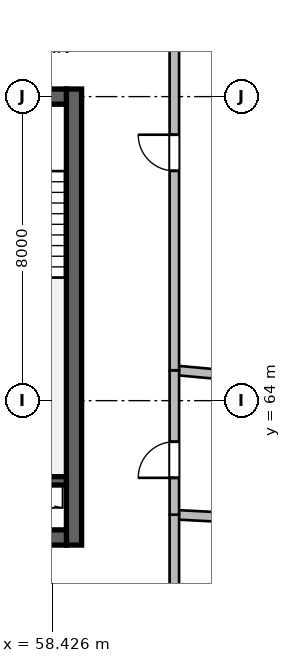
"""IFC4 building model, lengths in metres.
Left out: names, types, materials, properties, quantities, classifications, styles, units other than length and angle.
Written with IfcOpenShell. Run it as: python <this file> out.ifc"""

import sys

from ifc_helpers import new_model, si_unit, direction, frame, frame_2d, origin, place, context, subcontext, project, spatial, rectangle, extrude, source, transform, mapped, element, fill, save


model = new_model("IFC4")
c1 = context("Model", 3, precision=1e-05, world=origin(), true_north=direction((0.0, 1.0)))
c2 = subcontext(c1, "Body", "Model", "MODEL_VIEW")
j1 = project(units=[si_unit("LENGTHUNIT", "METRE"), si_unit("PLANEANGLEUNIT", "RADIAN")], contexts=[c1])
p1 = place(None, origin())
s1 = spatial("IfcSite", under=j1, at=p1, CompositionType="ELEMENT")
p2 = place(p1, origin())
s2 = spatial("IfcBuilding", under=s1, at=p2, CompositionType="ELEMENT")
p3 = place(p2, frame((0.0, 0.0, 260.1)))
s3 = spatial("IfcBuildingStorey", under=s2, at=p3, CompositionType="ELEMENT", Elevation=260.1)
m1 = source(origin(), c2, "Body", "SweptSolid", [
    extrude(rectangle(XDim=12.0, YDim=0.4, at=frame_2d((6.0, 0.0))), origin(), (0.0, 0.0, 1.0), 3.9),
])
p4 = place(p3, frame((59.0, 60.2, 0.0), z_axis=(0.0, 0.0, 1.0), x_axis=(0.0, 1.0, 0.0)))
e1 = element("IfcWall", 1, at=p4, inside=s3, PredefinedType="SHEAR", context=c2, shape_type="MappedRepresentation", body=[
    mapped(m1, transform((0.0, 0.0, 0.0), scale=1.0)),
])
m2 = source(origin(), c2, "Body", "SweptSolid", [
    extrude(rectangle(XDim=21.6, YDim=0.4, at=frame_2d((10.8, 0.0))), origin(), (0.0, 0.0, 1.0), 3.9),
])
p5 = place(p3, frame((37.2, 60.4, 0.0), z_axis=(0.0, 0.0, 1.0), x_axis=(1.0, 0.0, 0.0)))
e2 = element("IfcWall", 2, at=p5, inside=s3, PredefinedType="SHEAR", context=c2, shape_type="MappedRepresentation", body=[
    mapped(m2, transform((0.0, 0.0, 0.0), scale=1.0)),
])
p6 = place(p5, frame((1.1, 0.0, 0.0)))
e3 = element("IfcOpeningElement", 3, at=p6, cuts=e2, PredefinedType="OPENING", context=c2, shape_type="SweptSolid", body=[
    extrude(rectangle(XDim=1.15, YDim=2.15, at=frame_2d((0.575, 1.075))), frame((0.0, 0.21, 0.0), z_axis=(0.0, -1.0, 0.0), x_axis=(1.0, 0.0, 0.0)), (0.0, 0.0, 1.0), 0.42),
])
p7 = place(p5, frame((19.5, 0.0, 0.0)))
e4 = element("IfcOpeningElement", 4, at=p7, cuts=e2, PredefinedType="OPENING", context=c2, shape_type="SweptSolid", body=[
    extrude(rectangle(XDim=0.9, YDim=2.1, at=frame_2d((0.45, 1.05))), frame((0.0, 0.21, 0.0), z_axis=(0.0, -1.0, 0.0), x_axis=(1.0, 0.0, 0.0)), (0.0, 0.0, 1.0), 0.42),
])
p8 = place(p5, frame((12.02, 0.0, 0.0)))
e5 = element("IfcOpeningElement", 5, at=p8, cuts=e2, PredefinedType="OPENING", context=c2, shape_type="SweptSolid", body=[
    extrude(rectangle(XDim=1.6, YDim=2.15, at=frame_2d((0.8, 1.075))), frame((0.0, 0.21, 0.0), z_axis=(0.0, -1.0, 0.0), x_axis=(1.0, 0.0, 0.0)), (0.0, 0.0, 1.0), 0.42),
])
p9 = place(p3, frame((37.2, 72.0, 0.0), z_axis=(0.0, 0.0, 1.0), x_axis=(1.0, 0.0, 0.0)))
e6 = element("IfcWall", 6, at=p9, inside=s3, PredefinedType="SHEAR", context=c2, shape_type="MappedRepresentation", body=[
    mapped(m2, transform((0.0, 0.0, 0.0), scale=1.0)),
])
p10 = place(p9, frame((1.2, 0.0, 0.0)))
e7 = element("IfcOpeningElement", 7, at=p10, cuts=e6, PredefinedType="OPENING", context=c2, shape_type="SweptSolid", body=[
    extrude(rectangle(XDim=0.9, YDim=2.1, at=frame_2d((0.45, 1.05))), frame((0.0, 0.21, 0.0), z_axis=(0.0, -1.0, 0.0), x_axis=(1.0, 0.0, 0.0)), (0.0, 0.0, 1.0), 0.42),
])
p11 = place(p9, frame((14.7, 0.0, 0.0)))
e8 = element("IfcOpeningElement", 8, at=p11, cuts=e6, PredefinedType="OPENING", context=c2, shape_type="SweptSolid", body=[
    extrude(rectangle(XDim=1.2, YDim=2.15, at=frame_2d((0.6, 1.075))), frame((0.0, 0.21, 0.0), z_axis=(0.0, -1.0, 0.0), x_axis=(1.0, 0.0, 0.0)), (0.0, 0.0, 1.0), 0.42),
])
p12 = place(p9, frame((4.15, 0.0, 0.0)))
e9 = element("IfcOpeningElement", 9, at=p12, cuts=e6, PredefinedType="OPENING", context=c2, shape_type="SweptSolid", body=[
    extrude(rectangle(XDim=1.3, YDim=2.15, at=frame_2d((0.65, 1.075))), frame((0.0, 0.21, 0.0), z_axis=(0.0, -1.0, 0.0), x_axis=(1.0, 0.0, 0.0)), (0.0, 0.0, 1.0), 0.42),
])
p13 = place(p9, frame((7.1, 0.0, 0.0)))
e10 = element("IfcOpeningElement", 10, at=p13, cuts=e6, PredefinedType="OPENING", context=c2, shape_type="SweptSolid", body=[
    extrude(rectangle(XDim=0.9, YDim=2.1, at=frame_2d((0.45, 1.05))), frame((0.0, 0.21, 0.0), z_axis=(0.0, -1.0, 0.0), x_axis=(1.0, 0.0, 0.0)), (0.0, 0.0, 1.0), 0.42),
])
m3 = source(origin(), c2, "Body", "SweptSolid", [
    extrude(rectangle(XDim=3.27, YDim=0.22, at=frame_2d((1.635, 0.0))), origin(), (0.0, 0.0, 1.0), 3.9),
])
p14 = place(p3, frame((55.53, 61.89, 0.0), z_axis=(0.0, 0.0, 1.0), x_axis=(1.0, 0.0, 0.0)))
e11 = element("IfcWall", 11, at=p14, inside=s3, PredefinedType="SHEAR", context=c2, shape_type="MappedRepresentation", body=[
    mapped(m3, transform((0.0, 0.0, 0.0), scale=1.0)),
])
m4 = source(origin(), c2, "Body", "SweptSolid", [
    extrude(rectangle(XDim=12.938, YDim=0.25, at=frame_2d((6.469, 0.0))), origin(), (0.0, 0.0, 1.0), 3.65),
])
p15 = place(p3, frame((61.64, 61.0, 0.0), z_axis=(0.0, 0.0, 1.0), x_axis=(0.998643821866, -0.052062626215, 0.0)))
e12 = element("IfcWall", 12, at=p15, inside=s3, PredefinedType="PARTITIONING", context=c2, shape_type="MappedRepresentation", body=[
    mapped(m4, transform((0.0, 0.0, 0.0), scale=1.0)),
])
m5 = source(origin(), c2, "Body", "SweptSolid", [
    extrude(rectangle(XDim=3.04, YDim=0.25, at=frame_2d((1.52, 0.0))), origin(), (0.0, 0.0, 1.0), 3.65),
])
p16 = place(p3, frame((61.64, 57.96, 0.0), z_axis=(0.0, 0.0, 1.0), x_axis=(0.0, 1.0, 0.0)))
e13 = element("IfcWall", 13, at=p16, inside=s3, PredefinedType="PARTITIONING", context=c2, shape_type="MappedRepresentation", body=[
    mapped(m5, transform((0.0, 0.0, 0.0), scale=1.0)),
])
m6 = source(origin(), c2, "Body", "SweptSolid", [
    extrude(rectangle(XDim=13.228, YDim=0.25, at=frame_2d((6.614, 0.0))), origin(), (0.0, 0.0, 1.0), 3.65),
])
p17 = place(p3, frame((61.64, 64.8, 0.0), z_axis=(0.0, 0.0, 1.0), x_axis=(0.995868510157, -0.090806995755, 0.0)))
e14 = element("IfcWall", 14, at=p17, inside=s3, PredefinedType="PARTITIONING", context=c2, shape_type="MappedRepresentation", body=[
    mapped(m6, transform((0.0, 0.0, 0.0), scale=1.0)),
])
m7 = source(origin(), c2, "Body", "SweptSolid", [
    extrude(rectangle(XDim=3.8, YDim=0.25, at=frame_2d((1.9, 0.0))), origin(), (0.0, 0.0, 1.0), 3.65),
])
p18 = place(p3, frame((61.64, 61.0, 0.0), z_axis=(0.0, 0.0, 1.0), x_axis=(0.0, 1.0, 0.0)))
e15 = element("IfcWall", 15, at=p18, inside=s3, PredefinedType="PARTITIONING", context=c2, shape_type="MappedRepresentation", body=[
    mapped(m7, transform((0.0, 0.0, 0.0), scale=1.0)),
])
p19 = place(p18, frame((0.969, 0.0, 0.0)))
e16 = element("IfcOpeningElement", 16, at=p19, cuts=e15, PredefinedType="OPENING", context=c2, shape_type="SweptSolid", body=[
    extrude(rectangle(XDim=0.95, YDim=2.1, at=frame_2d((0.475, 1.05))), frame((0.0, 0.135, 0.0), z_axis=(0.0, -1.0, 0.0), x_axis=(1.0, 0.0, 0.0)), (0.0, 0.0, 1.0), 0.27),
])
m8 = source(origin(), c2, "Body", "SweptSolid", [
    extrude(rectangle(XDim=11.445, YDim=0.25, at=frame_2d((5.722, 0.0))), origin(), (0.0, 0.0, 1.0), 3.65),
])
p20 = place(p3, frame((61.64, 64.8, 0.0), z_axis=(0.0, 0.0, 1.0), x_axis=(0.0, 1.0, 0.0)))
e17 = element("IfcWall", 17, at=p20, inside=s3, PredefinedType="PARTITIONING", context=c2, shape_type="MappedRepresentation", body=[
    mapped(m8, transform((0.0, 0.0, 0.0), scale=1.0)),
])
p21 = place(p20, frame((5.247, 0.0, 0.0)))
e18 = element("IfcOpeningElement", 18, at=p21, cuts=e17, PredefinedType="OPENING", context=c2, shape_type="SweptSolid", body=[
    extrude(rectangle(XDim=0.95, YDim=2.1, at=frame_2d((0.475, 1.05))), frame((0.0, 0.135, 0.0), z_axis=(0.0, -1.0, 0.0), x_axis=(1.0, 0.0, 0.0)), (0.0, 0.0, 1.0), 0.27),
])
m9 = source(origin(), c2, "Body", "SweptSolid", [
    extrude(rectangle(XDim=0.95, YDim=2.1, at=frame_2d((0.475, 1.05))), frame((0.0, 0.025, 0.0), z_axis=(0.0, -1.0, 0.0), x_axis=(1.0, 0.0, 0.0)), (0.0, 0.0, 1.0), 0.05),
])
p22 = place(p19, origin())
e19 = element("IfcDoor", 19, at=p22, inside=s3, OperationType="SINGLE_SWING_LEFT", PredefinedType="DOOR", context=c2, shape_type="MappedRepresentation", body=[
    mapped(m9, transform((0.0, 0.0, 0.0), scale=1.0)),
])
fill(e16, e19)
p23 = place(p21, origin())
e20 = element("IfcDoor", 20, at=p23, inside=s3, OperationType="SINGLE_SWING_RIGHT", PredefinedType="DOOR", context=c2, shape_type="MappedRepresentation", body=[
    mapped(m9, transform((0.0, 0.0, 0.0), scale=1.0)),
])
fill(e18, e20)
save(model, sys.argv[1])
